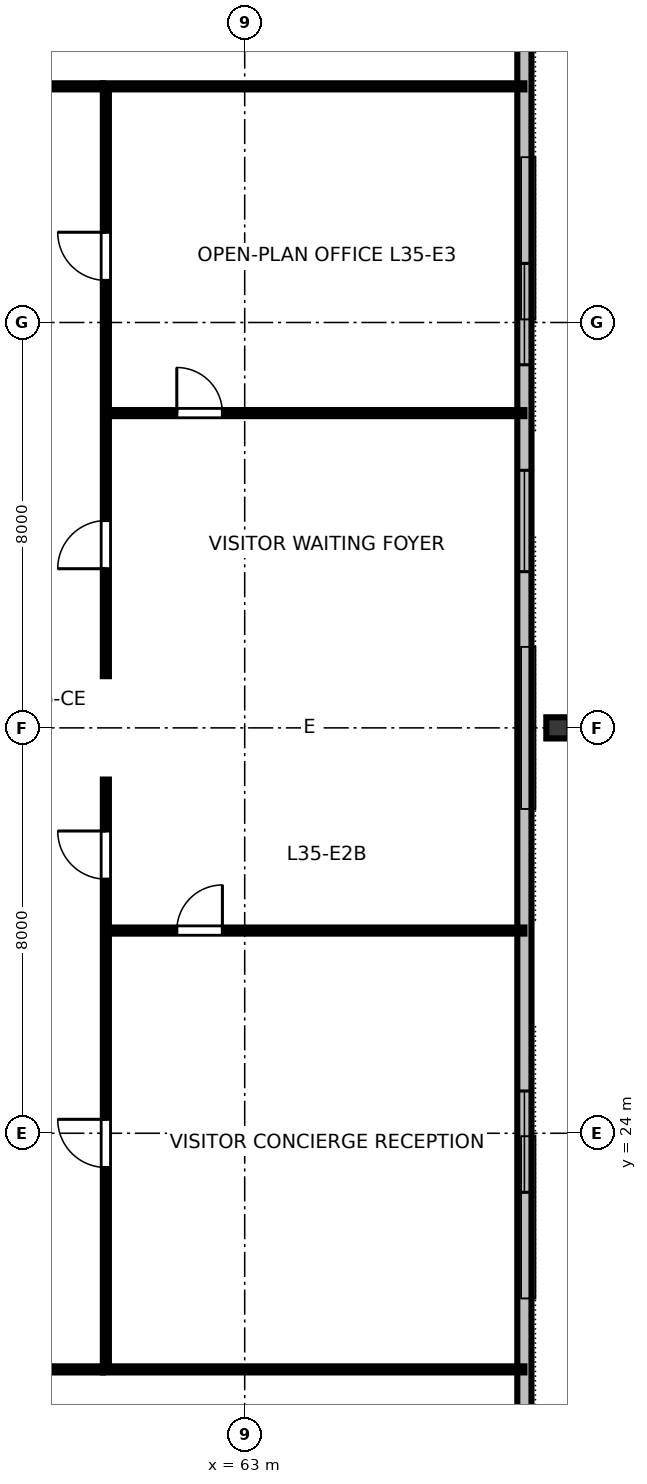
"""IFC4 building model, lengths in metres.
Left out: names, types, materials, properties, quantities, classifications, styles, units other than length and angle.
Written with IfcOpenShell. Run it as: python <this file> out.ifc"""

import sys

from ifc_helpers import new_model, si_unit, direction, frame, frame_2d, origin, origin_2d, place, context, subcontext, project, spatial, rectangle, i_section, extrude, element, fill, save


model = new_model("IFC4")
c1 = context("Model", 3, precision=1e-05, world=origin(), true_north=direction((0.0, 1.0)))
c2 = subcontext(c1, "Body", "Model", "MODEL_VIEW")
j1 = project(units=[si_unit("LENGTHUNIT", "METRE"), si_unit("PLANEANGLEUNIT", "RADIAN")], contexts=[c1])
p1 = place(None, origin())
s1 = spatial("IfcSite", under=j1, at=p1, CompositionType="ELEMENT")
p2 = place(p1, origin())
s2 = spatial("IfcBuilding", under=s1, at=p2, CompositionType="ELEMENT")
p3 = place(p2, frame((0.0, 0.0, 134.8)))
s3 = spatial("IfcBuildingStorey", under=s2, at=p3, CompositionType="ELEMENT", Elevation=134.8)
p4 = place(p3, frame((69.18, 32.0, 0.0), z_axis=(0.089001216718, 0.0, 0.996031517284), x_axis=(-0.996031517284, 0.0, 0.089001216718)))
e1 = element("IfcColumn", 1, at=p4, inside=s3, PredefinedType="COLUMN", context=c2, shape_type="SweptSolid", body=[
    extrude(i_section(OverallWidth=0.418, OverallDepth=0.455, WebThickness=0.042, FlangeThickness=0.068, FilletRadius=0.025, at=origin_2d()), origin(), (0.0, 0.0, 1.0), 3.371),
])
p5 = place(p3, frame((68.52, 16.61, 0.0), z_axis=(0.0, 0.0, 1.0), x_axis=(0.0, 1.0, 0.0)))
e2 = element("IfcWall", 2, at=p5, inside=s3, PredefinedType="STANDARD", context=c2, shape_type="SweptSolid", body=[
    extrude(rectangle(XDim=30.78, YDim=0.28, at=frame_2d((15.39, 0.0))), origin(), (0.0, 0.0, 1.0), 3.36),
])
p6 = place(p5, frame((6.224, 0.0, 0.8)))
e3 = element("IfcOpeningElement", 3, at=p6, cuts=e2, PredefinedType="OPENING", context=c2, shape_type="SweptSolid", body=[
    extrude(rectangle(XDim=2.0, YDim=1.95, at=frame_2d((1.0, 0.975))), frame((0.0, 0.15, 0.0), z_axis=(0.0, -1.0, 0.0), x_axis=(1.0, 0.0, 0.0)), (0.0, 0.0, 1.0), 0.3),
])
p7 = place(p5, frame((18.473, 0.0, 0.8)))
e4 = element("IfcOpeningElement", 4, at=p7, cuts=e2, PredefinedType="OPENING", context=c2, shape_type="SweptSolid", body=[
    extrude(rectangle(XDim=2.0, YDim=1.95, at=frame_2d((1.0, 0.975))), frame((0.0, 0.15, 0.0), z_axis=(0.0, -1.0, 0.0), x_axis=(1.0, 0.0, 0.0)), (0.0, 0.0, 1.0), 0.3),
])
p8 = place(p5, frame((22.556, 0.0, 0.8)))
e5 = element("IfcOpeningElement", 5, at=p8, cuts=e2, PredefinedType="OPENING", context=c2, shape_type="SweptSolid", body=[
    extrude(rectangle(XDim=2.0, YDim=1.95, at=frame_2d((1.0, 0.975))), frame((0.0, 0.15, 0.0), z_axis=(0.0, -1.0, 0.0), x_axis=(1.0, 0.0, 0.0)), (0.0, 0.0, 1.0), 0.3),
])
p9 = place(p3, frame((31.8, 19.34, 0.0), z_axis=(0.0, 0.0, 1.0), x_axis=(1.0, 0.0, 0.0)))
e6 = element("IfcWall", 6, at=p9, inside=s3, PredefinedType="PARTITIONING", context=c2, shape_type="SweptSolid", body=[
    extrude(rectangle(XDim=28.4, YDim=0.12, at=frame_2d((14.2, 0.0))), origin(), (0.0, 0.0, 1.0), 2.64),
])
p10 = place(p9, frame((4.955, 0.0, 0.0)))
e7 = element("IfcOpeningElement", 7, at=p10, cuts=e6, PredefinedType="OPENING", context=c2, shape_type="SweptSolid", body=[
    extrude(rectangle(XDim=0.95, YDim=2.15, at=frame_2d((0.475, 1.075))), frame((0.0, 0.07, 0.0), z_axis=(0.0, -1.0, 0.0), x_axis=(1.0, 0.0, 0.0)), (0.0, 0.0, 1.0), 0.14),
])
p11 = place(p9, frame((19.015, 0.0, 0.0)))
e8 = element("IfcOpeningElement", 8, at=p11, cuts=e6, PredefinedType="OPENING", context=c2, shape_type="SweptSolid", body=[
    extrude(rectangle(XDim=0.95, YDim=2.15, at=frame_2d((0.475, 1.075))), frame((0.0, 0.07, 0.0), z_axis=(0.0, -1.0, 0.0), x_axis=(1.0, 0.0, 0.0)), (0.0, 0.0, 1.0), 0.14),
])
p12 = place(p3, frame((31.8, 44.66, 0.0), z_axis=(0.0, 0.0, 1.0), x_axis=(1.0, 0.0, 0.0)))
e9 = element("IfcWall", 9, at=p12, inside=s3, PredefinedType="PARTITIONING", context=c2, shape_type="SweptSolid", body=[
    extrude(rectangle(XDim=28.4, YDim=0.12, at=frame_2d((14.2, 0.0))), origin(), (0.0, 0.0, 1.0), 2.64),
])
p13 = place(p12, frame((4.544, 0.0, 0.0)))
e10 = element("IfcOpeningElement", 10, at=p13, cuts=e9, PredefinedType="OPENING", context=c2, shape_type="SweptSolid", body=[
    extrude(rectangle(XDim=0.95, YDim=2.15, at=frame_2d((0.475, 1.075))), frame((0.0, 0.07, 0.0), z_axis=(0.0, -1.0, 0.0), x_axis=(1.0, 0.0, 0.0)), (0.0, 0.0, 1.0), 0.14),
])
p14 = place(p12, frame((11.807, 0.0, 0.0)))
e11 = element("IfcOpeningElement", 11, at=p14, cuts=e9, PredefinedType="OPENING", context=c2, shape_type="SweptSolid", body=[
    extrude(rectangle(XDim=0.95, YDim=2.15, at=frame_2d((0.475, 1.075))), frame((0.0, 0.07, 0.0), z_axis=(0.0, -1.0, 0.0), x_axis=(1.0, 0.0, 0.0)), (0.0, 0.0, 1.0), 0.14),
])
p15 = place(p12, frame((17.048, 0.0, 0.0)))
e12 = element("IfcOpeningElement", 12, at=p15, cuts=e9, PredefinedType="OPENING", context=c2, shape_type="SweptSolid", body=[
    extrude(rectangle(XDim=0.95, YDim=2.15, at=frame_2d((0.475, 1.075))), frame((0.0, 0.07, 0.0), z_axis=(0.0, -1.0, 0.0), x_axis=(1.0, 0.0, 0.0)), (0.0, 0.0, 1.0), 0.14),
])
p16 = place(p12, frame((23.845, 0.0, 0.0)))
e13 = element("IfcOpeningElement", 13, at=p16, cuts=e9, PredefinedType="OPENING", context=c2, shape_type="SweptSolid", body=[
    extrude(rectangle(XDim=0.95, YDim=2.15, at=frame_2d((0.475, 1.075))), frame((0.0, 0.07, 0.0), z_axis=(0.0, -1.0, 0.0), x_axis=(1.0, 0.0, 0.0)), (0.0, 0.0, 1.0), 0.14),
])
p17 = place(p3, frame((60.26, 28.0, 0.0), z_axis=(0.0, 0.0, 1.0), x_axis=(1.0, 0.0, 0.0)))
e14 = element("IfcWall", 14, at=p17, inside=s3, PredefinedType="PARTITIONING", context=c2, shape_type="SweptSolid", body=[
    extrude(rectangle(XDim=8.26, YDim=0.12, at=frame_2d((4.13, 0.0))), origin(), (0.0, 0.0, 1.0), 2.64),
])
p18 = place(p17, frame((1.4, 0.0, 0.0)))
e15 = element("IfcOpeningElement", 15, at=p18, cuts=e14, PredefinedType="OPENING", context=c2, shape_type="SweptSolid", body=[
    extrude(rectangle(XDim=0.9, YDim=2.15, at=frame_2d((0.45, 1.075))), frame((0.0, 0.07, 0.0), z_axis=(0.0, -1.0, 0.0), x_axis=(1.0, 0.0, 0.0)), (0.0, 0.0, 1.0), 0.14),
])
p19 = place(p3, frame((60.26, 38.212, 0.0), z_axis=(0.0, 0.0, 1.0), x_axis=(1.0, 0.0, 0.0)))
e16 = element("IfcWall", 16, at=p19, inside=s3, PredefinedType="PARTITIONING", context=c2, shape_type="SweptSolid", body=[
    extrude(rectangle(XDim=8.26, YDim=0.12, at=frame_2d((4.13, 0.0))), origin(), (0.0, 0.0, 1.0), 2.64),
])
p20 = place(p19, frame((1.4, 0.0, 0.0)))
e17 = element("IfcOpeningElement", 17, at=p20, cuts=e16, PredefinedType="OPENING", context=c2, shape_type="SweptSolid", body=[
    extrude(rectangle(XDim=0.9, YDim=2.15, at=frame_2d((0.45, 1.075))), frame((0.0, 0.07, 0.0), z_axis=(0.0, -1.0, 0.0), x_axis=(1.0, 0.0, 0.0)), (0.0, 0.0, 1.0), 0.14),
])
p21 = place(p3, frame((60.26, 19.4, 0.0), z_axis=(0.0, 0.0, 1.0), x_axis=(0.0, 1.0, 0.0)))
e18 = element("IfcWall", 18, at=p21, inside=s3, PredefinedType="PARTITIONING", context=c2, shape_type="SweptSolid", body=[
    extrude(rectangle(XDim=11.58, YDim=0.12, at=frame_2d((5.79, 0.0))), origin(), (0.0, 0.0, 1.0), 2.64),
])
p22 = place(p21, frame((3.925, 0.0, 0.0)))
e19 = element("IfcOpeningElement", 19, at=p22, cuts=e18, PredefinedType="OPENING", context=c2, shape_type="SweptSolid", body=[
    extrude(rectangle(XDim=0.95, YDim=2.15, at=frame_2d((0.475, 1.075))), frame((0.0, 0.07, 0.0), z_axis=(0.0, -1.0, 0.0), x_axis=(1.0, 0.0, 0.0)), (0.0, 0.0, 1.0), 0.14),
])
p23 = place(p21, frame((9.615, 0.0, 0.0)))
e20 = element("IfcOpeningElement", 20, at=p23, cuts=e18, PredefinedType="OPENING", context=c2, shape_type="SweptSolid", body=[
    extrude(rectangle(XDim=0.95, YDim=2.15, at=frame_2d((0.475, 1.075))), frame((0.0, 0.07, 0.0), z_axis=(0.0, -1.0, 0.0), x_axis=(1.0, 0.0, 0.0)), (0.0, 0.0, 1.0), 0.14),
])
p24 = place(p3, frame((60.26, 33.02, 0.0), z_axis=(0.0, 0.0, 1.0), x_axis=(0.0, 1.0, 0.0)))
e21 = element("IfcWall", 21, at=p24, inside=s3, PredefinedType="PARTITIONING", context=c2, shape_type="SweptSolid", body=[
    extrude(rectangle(XDim=11.58, YDim=0.12, at=frame_2d((5.79, 0.0))), origin(), (0.0, 0.0, 1.0), 2.64),
])
p25 = place(p24, frame((2.121, 0.0, 0.0)))
e22 = element("IfcOpeningElement", 22, at=p25, cuts=e21, PredefinedType="OPENING", context=c2, shape_type="SweptSolid", body=[
    extrude(rectangle(XDim=0.95, YDim=2.15, at=frame_2d((0.475, 1.075))), frame((0.0, 0.07, 0.0), z_axis=(0.0, -1.0, 0.0), x_axis=(1.0, 0.0, 0.0)), (0.0, 0.0, 1.0), 0.14),
])
p26 = place(p24, frame((7.811, 0.0, 0.0)))
e23 = element("IfcOpeningElement", 23, at=p26, cuts=e21, PredefinedType="OPENING", context=c2, shape_type="SweptSolid", body=[
    extrude(rectangle(XDim=0.95, YDim=2.15, at=frame_2d((0.475, 1.075))), frame((0.0, 0.07, 0.0), z_axis=(0.0, -1.0, 0.0), x_axis=(1.0, 0.0, 0.0)), (0.0, 0.0, 1.0), 0.14),
])
for number, where, z_axis, x_axis in (
    (24, (60.2, 19.34, 0.0), (0.0, 0.0, 1.0), (1.0, 0.0, 0.0)),
    (25, (60.2, 44.66, 0.0), (0.0, 0.0, 1.0), (1.0, 0.0, 0.0)),
):
    element("IfcWall", number, at=place(p3, frame(where, z_axis=z_axis, x_axis=x_axis)), inside=s3, PredefinedType="PARTITIONING", context=c2, shape_type="SweptSolid", body=[
        extrude(rectangle(XDim=8.32, YDim=0.12, at=frame_2d((4.16, 0.0))), origin(), (0.0, 0.0, 1.0), 2.64),
    ])
p27 = place(p6, origin())
e26 = element("IfcWindow", 26, at=p27, inside=s3, PartitioningType="SINGLE_PANEL", PredefinedType="WINDOW", context=c2, shape_type="SweptSolid", body=[
    extrude(rectangle(XDim=2.0, YDim=1.95, at=frame_2d((1.0, 0.975))), frame((0.0, 0.03, 0.0), z_axis=(0.0, -1.0, 0.0), x_axis=(1.0, 0.0, 0.0)), (0.0, 0.0, 1.0), 0.06),
])
fill(e3, e26)
p28 = place(p7, origin())
e27 = element("IfcWindow", 27, at=p28, inside=s3, PartitioningType="SINGLE_PANEL", PredefinedType="WINDOW", context=c2, shape_type="SweptSolid", body=[
    extrude(rectangle(XDim=2.0, YDim=1.95, at=frame_2d((1.0, 0.975))), frame((0.0, 0.03, 0.0), z_axis=(0.0, -1.0, 0.0), x_axis=(1.0, 0.0, 0.0)), (0.0, 0.0, 1.0), 0.06),
])
fill(e4, e27)
p29 = place(p8, origin())
e28 = element("IfcWindow", 28, at=p29, inside=s3, PartitioningType="SINGLE_PANEL", PredefinedType="WINDOW", context=c2, shape_type="SweptSolid", body=[
    extrude(rectangle(XDim=2.0, YDim=1.95, at=frame_2d((1.0, 0.975))), frame((0.0, 0.03, 0.0), z_axis=(0.0, -1.0, 0.0), x_axis=(1.0, 0.0, 0.0)), (0.0, 0.0, 1.0), 0.06),
])
fill(e5, e28)
p30 = place(p18, origin())
e29 = element("IfcDoor", 29, at=p30, inside=s3, OperationType="SINGLE_SWING_RIGHT", PredefinedType="DOOR", context=c2, shape_type="SweptSolid", body=[
    extrude(rectangle(XDim=0.9, YDim=2.15, at=frame_2d((0.45, 1.075))), frame((0.0, 0.025, 0.0), z_axis=(0.0, -1.0, 0.0), x_axis=(1.0, 0.0, 0.0)), (0.0, 0.0, 1.0), 0.05),
])
fill(e15, e29)
p31 = place(p20, origin())
e30 = element("IfcDoor", 30, at=p31, inside=s3, OperationType="SINGLE_SWING_LEFT", PredefinedType="DOOR", context=c2, shape_type="SweptSolid", body=[
    extrude(rectangle(XDim=0.9, YDim=2.15, at=frame_2d((0.45, 1.075))), frame((0.0, 0.025, 0.0), z_axis=(0.0, -1.0, 0.0), x_axis=(1.0, 0.0, 0.0)), (0.0, 0.0, 1.0), 0.05),
])
fill(e17, e30)
p32 = place(p22, origin())
e31 = element("IfcDoor", 31, at=p32, inside=s3, OperationType="SINGLE_SWING_RIGHT", PredefinedType="DOOR", context=c2, shape_type="SweptSolid", body=[
    extrude(rectangle(XDim=0.95, YDim=2.15, at=frame_2d((0.475, 1.075))), frame((0.0, 0.025, 0.0), z_axis=(0.0, -1.0, 0.0), x_axis=(1.0, 0.0, 0.0)), (0.0, 0.0, 1.0), 0.05),
])
fill(e19, e31)
p33 = place(p23, origin())
e32 = element("IfcDoor", 32, at=p33, inside=s3, OperationType="SINGLE_SWING_RIGHT", PredefinedType="DOOR", context=c2, shape_type="SweptSolid", body=[
    extrude(rectangle(XDim=0.95, YDim=2.15, at=frame_2d((0.475, 1.075))), frame((0.0, 0.025, 0.0), z_axis=(0.0, -1.0, 0.0), x_axis=(1.0, 0.0, 0.0)), (0.0, 0.0, 1.0), 0.05),
])
fill(e20, e32)
p34 = place(p25, origin())
e33 = element("IfcDoor", 33, at=p34, inside=s3, OperationType="SINGLE_SWING_LEFT", PredefinedType="DOOR", context=c2, shape_type="SweptSolid", body=[
    extrude(rectangle(XDim=0.95, YDim=2.15, at=frame_2d((0.475, 1.075))), frame((0.0, 0.025, 0.0), z_axis=(0.0, -1.0, 0.0), x_axis=(1.0, 0.0, 0.0)), (0.0, 0.0, 1.0), 0.05),
])
fill(e22, e33)
p35 = place(p26, origin())
e34 = element("IfcDoor", 34, at=p35, inside=s3, OperationType="SINGLE_SWING_RIGHT", PredefinedType="DOOR", context=c2, shape_type="SweptSolid", body=[
    extrude(rectangle(XDim=0.95, YDim=2.15, at=frame_2d((0.475, 1.075))), frame((0.0, 0.025, 0.0), z_axis=(0.0, -1.0, 0.0), x_axis=(1.0, 0.0, 0.0)), (0.0, 0.0, 1.0), 0.05),
])
fill(e23, e34)
save(model, sys.argv[1])
